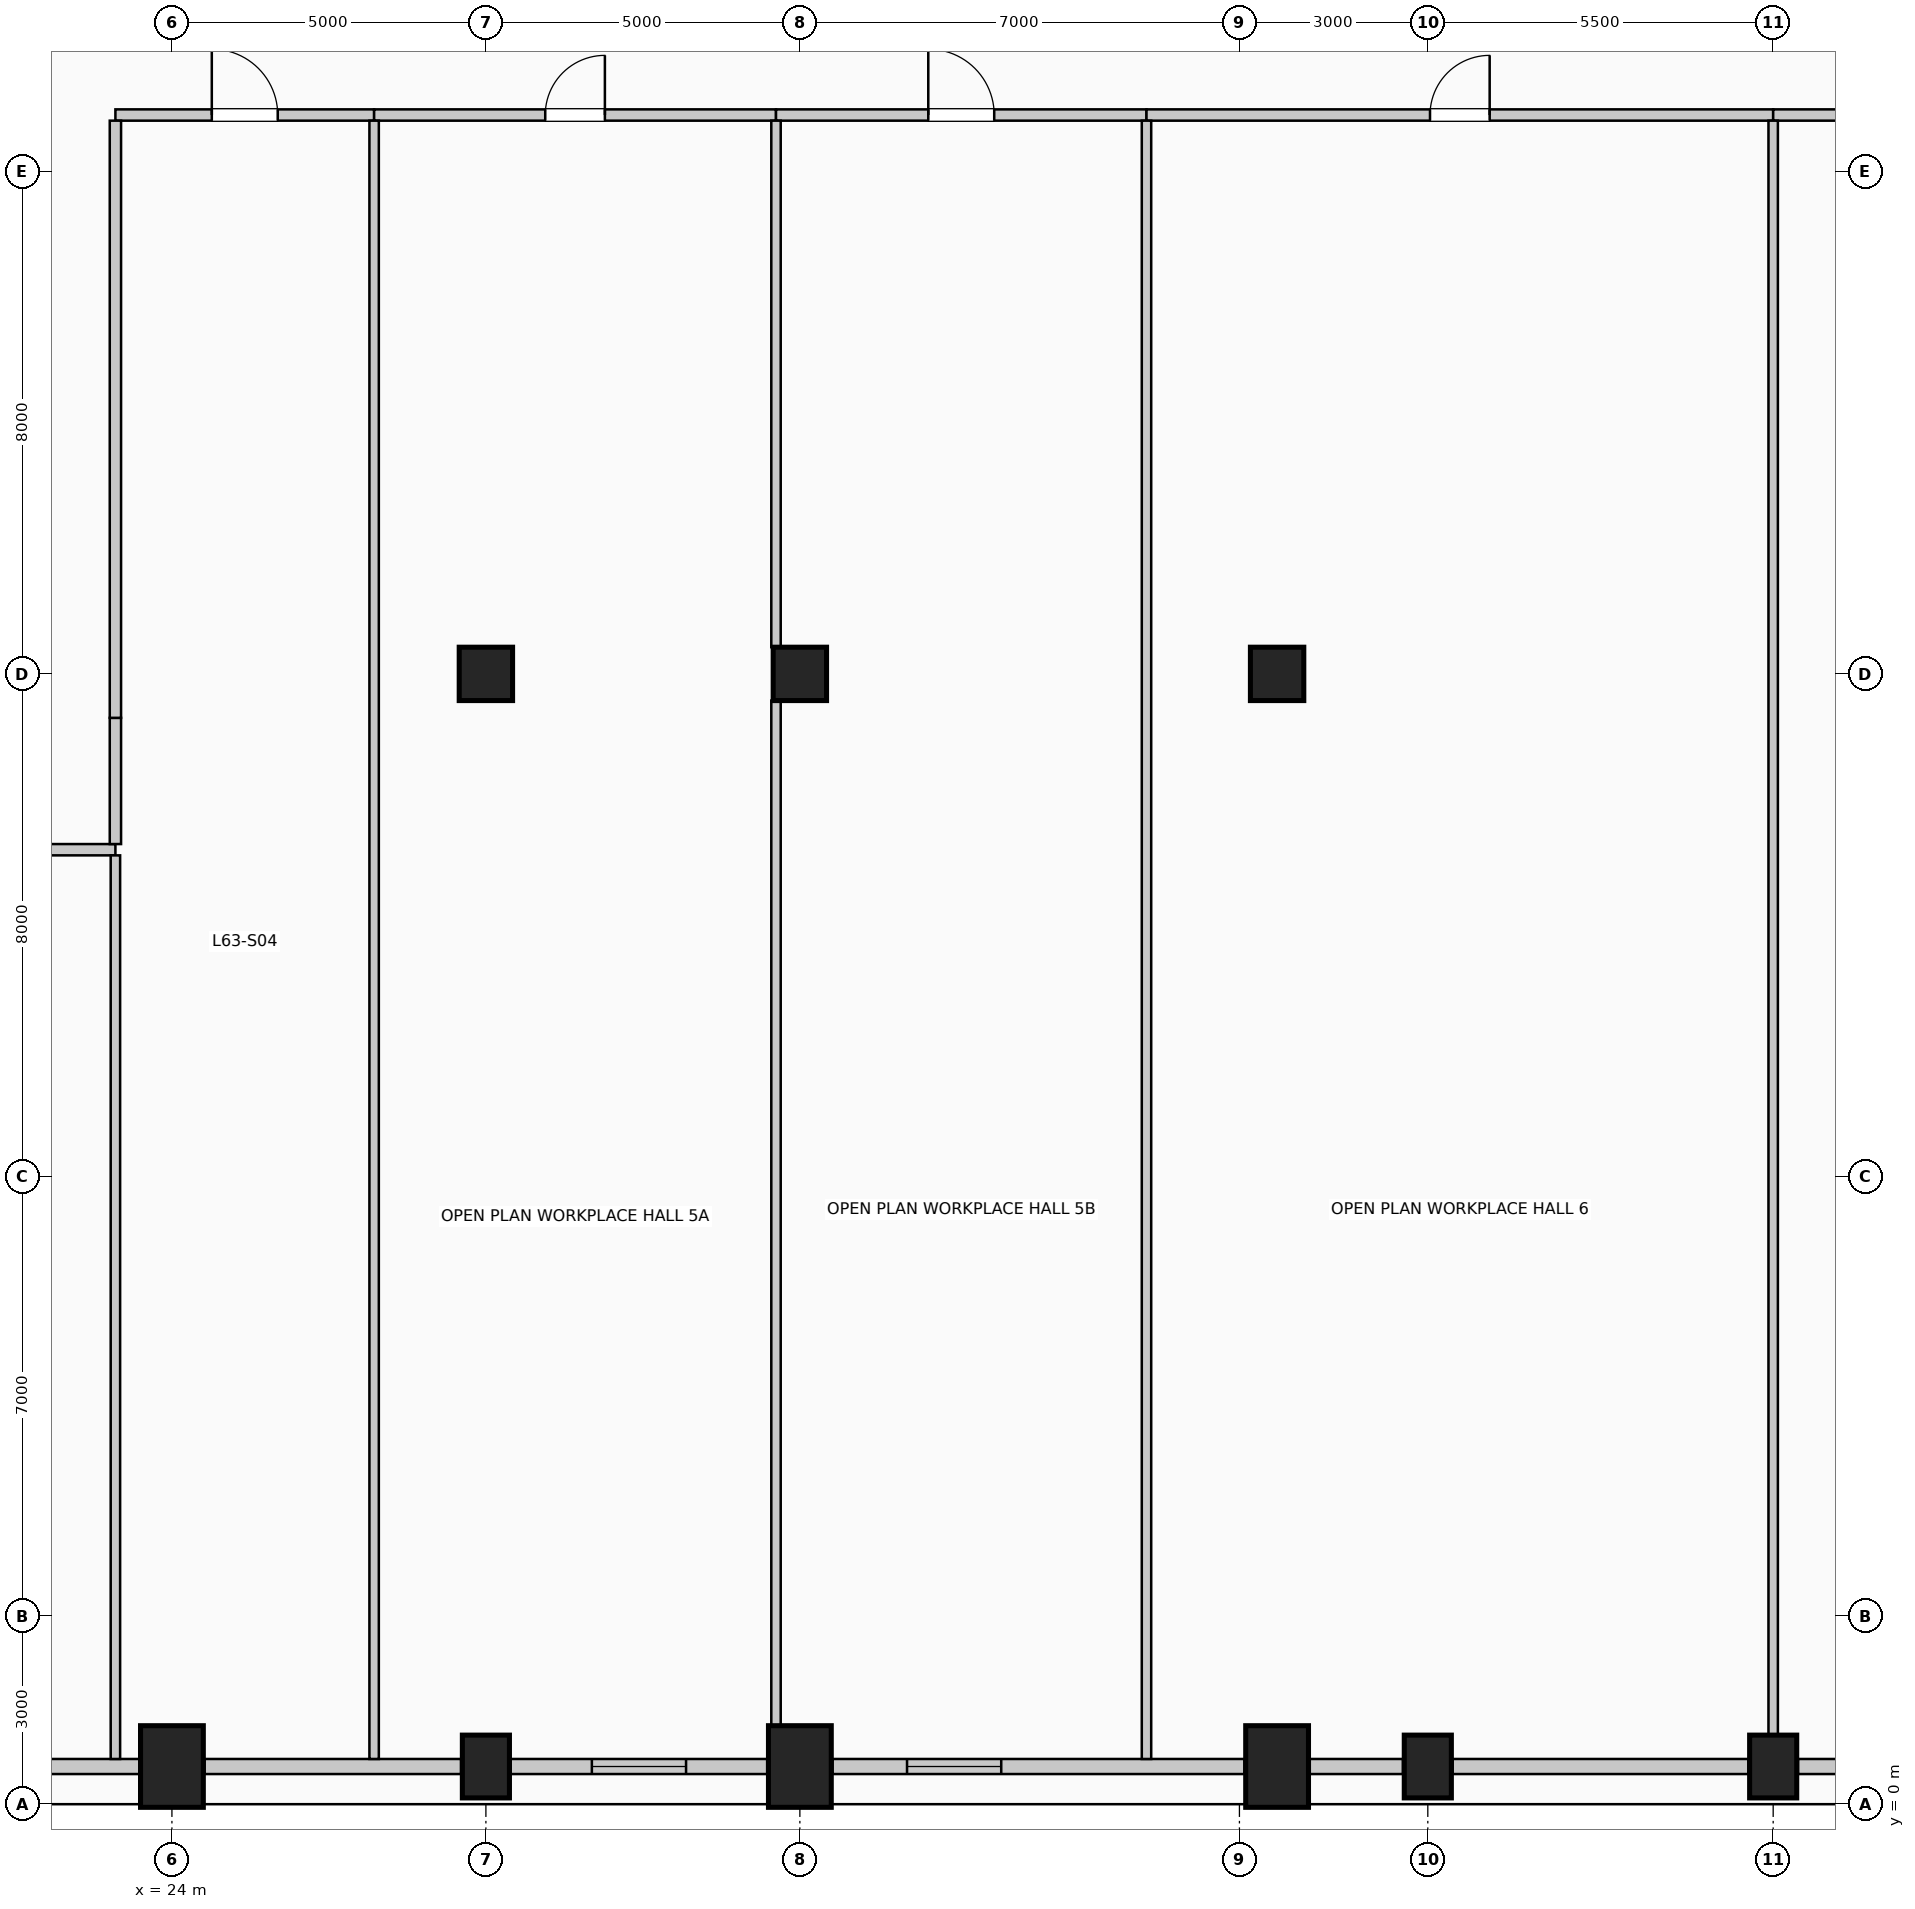
"""IFC4 building model, lengths in metres.
Left out: names, types, materials, properties, quantities, classifications, styles, units other than length and angle.
Written with IfcOpenShell. Run it as: python <this file> out.ifc"""

import sys

from ifc_helpers import new_model, si_unit, direction, frame, frame_2d, origin, origin_2d, place, context, subcontext, project, spatial, rectangle, circle, extrude, element, fill, save


model = new_model("IFC4")
c1 = context("Model", 3, precision=1e-05, world=origin(), true_north=direction((0.0, 1.0)))
c2 = subcontext(c1, "Body", "Model", "MODEL_VIEW")
j1 = project(units=[si_unit("LENGTHUNIT", "METRE"), si_unit("PLANEANGLEUNIT", "RADIAN")], contexts=[c1])
p1 = place(None, origin())
s1 = spatial("IfcSite", under=j1, at=p1, CompositionType="ELEMENT")
p2 = place(p1, origin())
s2 = spatial("IfcBuilding", under=s1, at=p2, CompositionType="ELEMENT")
p3 = place(p2, frame((0.0, 0.0, 260.6)))
s3 = spatial("IfcBuildingStorey", under=s2, at=p3, CompositionType="ELEMENT", Elevation=260.6)
p4 = place(p3, frame((24.0, 0.6, 0.0), z_axis=(0.0, 0.0, 1.0), x_axis=(1.0, 0.0, 0.0)))
e1 = element("IfcColumn", 1, at=p4, inside=s3, PredefinedType="COLUMN", context=c2, shape_type="SweptSolid", body=[
    extrude(rectangle(XDim=1.0, YDim=1.3, at=origin_2d()), origin(), (0.0, 0.0, 1.0), 4.0),
])
p5 = place(p3, frame((29.0, 0.6, 0.0), z_axis=(0.0, 0.0, 1.0), x_axis=(1.0, 0.0, 0.0)))
e2 = element("IfcColumn", 2, at=p5, inside=s3, PredefinedType="COLUMN", context=c2, shape_type="SweptSolid", body=[
    extrude(rectangle(XDim=0.75, YDim=1.0, at=origin_2d()), origin(), (0.0, 0.0, 1.0), 4.0),
])
for number, where, z_axis, x_axis in (
    (3, (34.0, 0.6, 0.0), (0.0, 0.0, 1.0), (1.0, 0.0, 0.0)),
    (4, (41.6, 0.6, 0.0), (0.0, 0.0, 1.0), (1.0, 0.0, 0.0)),
):
    element("IfcColumn", number, at=place(p3, frame(where, z_axis=z_axis, x_axis=x_axis)), inside=s3, PredefinedType="COLUMN", context=c2, shape_type="SweptSolid", body=[
        extrude(rectangle(XDim=1.0, YDim=1.3, at=origin_2d()), origin(), (0.0, 0.0, 1.0), 4.0),
    ])
for number, where, z_axis, x_axis in (
    (5, (44.0, 0.6, 0.0), (0.0, 0.0, 1.0), (1.0, 0.0, 0.0)),
    (6, (49.5, 0.6, 0.0), (0.0, 0.0, 1.0), (1.0, 0.0, 0.0)),
):
    element("IfcColumn", number, at=place(p3, frame(where, z_axis=z_axis, x_axis=x_axis)), inside=s3, PredefinedType="COLUMN", context=c2, shape_type="SweptSolid", body=[
        extrude(rectangle(XDim=0.75, YDim=1.0, at=origin_2d()), origin(), (0.0, 0.0, 1.0), 4.0),
    ])
for number, where, z_axis, x_axis in (
    (7, (29.0, 18.0, 0.0), (0.0, 0.0, 1.0), (1.0, 0.0, 0.0)),
    (8, (41.6, 18.0, 0.0), (0.0, 0.0, 1.0), (1.0, 0.0, 0.0)),
    (9, (34.0, 18.0, 0.0), (0.0, 0.0, 1.0), (1.0, 0.0, 0.0)),
):
    element("IfcColumn", number, at=place(p3, frame(where, z_axis=z_axis, x_axis=x_axis)), inside=s3, PredefinedType="COLUMN", context=c2, shape_type="SweptSolid", body=[
        extrude(circle(Radius=0.425, at=origin_2d()), origin(), (0.0, 0.0, 1.0), 4.0),
    ])
p6 = place(p3, frame((23.48, 0.6, 0.0), z_axis=(0.0, 0.0, 1.0), x_axis=(-1.0, 0.0, 0.0)))
e10 = element("IfcWall", 10, at=p6, inside=s3, PredefinedType="SOLIDWALL", context=c2, shape_type="SweptSolid", body=[
    extrude(rectangle(XDim=6.56, YDim=0.24, at=frame_2d((3.28, 0.0))), origin(), (0.0, 0.0, 1.0), 3.0),
])
p7 = place(p6, frame((3.873, 0.0, 0.42)))
e11 = element("IfcOpeningElement", 11, at=p7, cuts=e10, PredefinedType="OPENING", context=c2, shape_type="SweptSolid", body=[
    extrude(rectangle(XDim=1.5, YDim=2.2, at=frame_2d((0.75, 1.1))), frame((0.0, 0.13, 0.0), z_axis=(0.0, -1.0, 0.0), x_axis=(1.0, 0.0, 0.0)), (0.0, 0.0, 1.0), 0.26),
])
p8 = place(p3, frame((28.605, 0.6, 0.0), z_axis=(0.0, 0.0, 1.0), x_axis=(-1.0, 0.0, 0.0)))
e12 = element("IfcWall", 12, at=p8, inside=s3, PredefinedType="SOLIDWALL", context=c2, shape_type="SweptSolid", body=[
    extrude(rectangle(XDim=4.085, YDim=0.24, at=frame_2d((2.042, 0.0))), origin(), (0.0, 0.0, 1.0), 3.0),
])
p9 = place(p3, frame((33.48, 0.6, 0.0), z_axis=(0.0, 0.0, 1.0), x_axis=(-1.0, 0.0, 0.0)))
e13 = element("IfcWall", 13, at=p9, inside=s3, PredefinedType="SOLIDWALL", context=c2, shape_type="SweptSolid", body=[
    extrude(rectangle(XDim=4.085, YDim=0.24, at=frame_2d((2.042, 0.0))), origin(), (0.0, 0.0, 1.0), 3.0),
])
p10 = place(p9, frame((1.292, 0.0, 0.42)))
e14 = element("IfcOpeningElement", 14, at=p10, cuts=e13, PredefinedType="OPENING", context=c2, shape_type="SweptSolid", body=[
    extrude(rectangle(XDim=1.5, YDim=2.2, at=frame_2d((0.75, 1.1))), frame((0.0, 0.13, 0.0), z_axis=(0.0, -1.0, 0.0), x_axis=(1.0, 0.0, 0.0)), (0.0, 0.0, 1.0), 0.26),
])
p11 = place(p3, frame((41.08, 0.6, 0.0), z_axis=(0.0, 0.0, 1.0), x_axis=(-1.0, 0.0, 0.0)))
e15 = element("IfcWall", 15, at=p11, inside=s3, PredefinedType="SOLIDWALL", context=c2, shape_type="SweptSolid", body=[
    extrude(rectangle(XDim=6.56, YDim=0.24, at=frame_2d((3.28, 0.0))), origin(), (0.0, 0.0, 1.0), 3.0),
])
p12 = place(p11, frame((3.873, 0.0, 0.42)))
e16 = element("IfcOpeningElement", 16, at=p12, cuts=e15, PredefinedType="OPENING", context=c2, shape_type="SweptSolid", body=[
    extrude(rectangle(XDim=1.5, YDim=2.2, at=frame_2d((0.75, 1.1))), frame((0.0, 0.13, 0.0), z_axis=(0.0, -1.0, 0.0), x_axis=(1.0, 0.0, 0.0)), (0.0, 0.0, 1.0), 0.26),
])
p13 = place(p3, frame((43.605, 0.6, 0.0), z_axis=(0.0, 0.0, 1.0), x_axis=(-1.0, 0.0, 0.0)))
e17 = element("IfcWall", 17, at=p13, inside=s3, PredefinedType="SOLIDWALL", context=c2, shape_type="SweptSolid", body=[
    extrude(rectangle(XDim=1.485, YDim=0.24, at=frame_2d((0.742, 0.0))), origin(), (0.0, 0.0, 1.0), 3.0),
])
p14 = place(p3, frame((49.105, 0.6, 0.0), z_axis=(0.0, 0.0, 1.0), x_axis=(-1.0, 0.0, 0.0)))
e18 = element("IfcWall", 18, at=p14, inside=s3, PredefinedType="SOLIDWALL", context=c2, shape_type="SweptSolid", body=[
    extrude(rectangle(XDim=4.71, YDim=0.24, at=frame_2d((2.355, 0.0))), origin(), (0.0, 0.0, 1.0), 3.0),
])
p15 = place(p3, frame((54.005, 0.6, 0.0), z_axis=(0.0, 0.0, 1.0), x_axis=(-1.0, 0.0, 0.0)))
e19 = element("IfcWall", 19, at=p15, inside=s3, PredefinedType="SOLIDWALL", context=c2, shape_type="SweptSolid", body=[
    extrude(rectangle(XDim=4.11, YDim=0.24, at=frame_2d((2.055, 0.0))), origin(), (0.0, 0.0, 1.0), 3.0),
])
p16 = place(p15, frame((1.305, 0.0, 0.42)))
e20 = element("IfcOpeningElement", 20, at=p16, cuts=e19, PredefinedType="OPENING", context=c2, shape_type="SweptSolid", body=[
    extrude(rectangle(XDim=1.5, YDim=2.2, at=frame_2d((0.75, 1.1))), frame((0.0, 0.13, 0.0), z_axis=(0.0, -1.0, 0.0), x_axis=(1.0, 0.0, 0.0)), (0.0, 0.0, 1.0), 0.26),
])
p17 = place(p3, frame((16.4, 15.2, 0.0), z_axis=(0.0, 0.0, 1.0), x_axis=(1.0, 0.0, 0.0)))
e21 = element("IfcWall", 21, at=p17, inside=s3, PredefinedType="PARTITIONING", context=c2, shape_type="SweptSolid", body=[
    extrude(rectangle(XDim=6.7, YDim=0.18, at=frame_2d((3.35, 0.0))), origin(), (0.0, 0.0, 1.0), 3.75),
])
p18 = place(p17, frame((2.875, 0.0, 0.0)))
e22 = element("IfcOpeningElement", 22, at=p18, cuts=e21, PredefinedType="OPENING", context=c2, shape_type="SweptSolid", body=[
    extrude(rectangle(XDim=0.95, YDim=2.15, at=frame_2d((0.475, 1.075))), frame((0.0, 0.1, 0.0), z_axis=(0.0, -1.0, 0.0), x_axis=(1.0, 0.0, 0.0)), (0.0, 0.0, 1.0), 0.2),
])
p19 = place(p3, frame((23.1, 26.9, 0.0), z_axis=(0.0, 0.0, 1.0), x_axis=(1.0, 0.0, 0.0)))
e23 = element("IfcWall", 23, at=p19, inside=s3, PredefinedType="PARTITIONING", context=c2, shape_type="SweptSolid", body=[
    extrude(rectangle(XDim=4.12, YDim=0.18, at=frame_2d((2.06, 0.0))), origin(), (0.0, 0.0, 1.0), 3.75),
])
p20 = place(p19, frame((1.535, 0.0, 0.0)))
e24 = element("IfcOpeningElement", 24, at=p20, cuts=e23, PredefinedType="OPENING", context=c2, shape_type="SweptSolid", body=[
    extrude(rectangle(XDim=1.05, YDim=2.15, at=frame_2d((0.525, 1.075))), frame((0.0, 0.1, 0.0), z_axis=(0.0, -1.0, 0.0), x_axis=(1.0, 0.0, 0.0)), (0.0, 0.0, 1.0), 0.2),
])
p21 = place(p3, frame((27.22, 26.9, 0.0), z_axis=(0.0, 0.0, 1.0), x_axis=(1.0, 0.0, 0.0)))
e25 = element("IfcWall", 25, at=p21, inside=s3, PredefinedType="PARTITIONING", context=c2, shape_type="SweptSolid", body=[
    extrude(rectangle(XDim=6.4, YDim=0.18, at=frame_2d((3.2, 0.0))), origin(), (0.0, 0.0, 1.0), 3.75),
])
p22 = place(p21, frame((2.725, 0.0, 0.0)))
e26 = element("IfcOpeningElement", 26, at=p22, cuts=e25, PredefinedType="OPENING", context=c2, shape_type="SweptSolid", body=[
    extrude(rectangle(XDim=0.95, YDim=2.15, at=frame_2d((0.475, 1.075))), frame((0.0, 0.1, 0.0), z_axis=(0.0, -1.0, 0.0), x_axis=(1.0, 0.0, 0.0)), (0.0, 0.0, 1.0), 0.2),
])
p23 = place(p3, frame((33.62, 26.9, 0.0), z_axis=(0.0, 0.0, 1.0), x_axis=(1.0, 0.0, 0.0)))
e27 = element("IfcWall", 27, at=p23, inside=s3, PredefinedType="PARTITIONING", context=c2, shape_type="SweptSolid", body=[
    extrude(rectangle(XDim=5.9, YDim=0.18, at=frame_2d((2.95, 0.0))), origin(), (0.0, 0.0, 1.0), 3.75),
])
p24 = place(p23, frame((2.425, 0.0, 0.0)))
e28 = element("IfcOpeningElement", 28, at=p24, cuts=e27, PredefinedType="OPENING", context=c2, shape_type="SweptSolid", body=[
    extrude(rectangle(XDim=1.05, YDim=2.15, at=frame_2d((0.525, 1.075))), frame((0.0, 0.1, 0.0), z_axis=(0.0, -1.0, 0.0), x_axis=(1.0, 0.0, 0.0)), (0.0, 0.0, 1.0), 0.2),
])
p25 = place(p3, frame((39.52, 26.9, 0.0), z_axis=(0.0, 0.0, 1.0), x_axis=(1.0, 0.0, 0.0)))
e29 = element("IfcWall", 29, at=p25, inside=s3, PredefinedType="PARTITIONING", context=c2, shape_type="SweptSolid", body=[
    extrude(rectangle(XDim=9.98, YDim=0.18, at=frame_2d((4.99, 0.0))), origin(), (0.0, 0.0, 1.0), 3.75),
])
p26 = place(p25, frame((4.515, 0.0, 0.0)))
e30 = element("IfcOpeningElement", 30, at=p26, cuts=e29, PredefinedType="OPENING", context=c2, shape_type="SweptSolid", body=[
    extrude(rectangle(XDim=0.95, YDim=2.15, at=frame_2d((0.475, 1.075))), frame((0.0, 0.1, 0.0), z_axis=(0.0, -1.0, 0.0), x_axis=(1.0, 0.0, 0.0)), (0.0, 0.0, 1.0), 0.2),
])
p27 = place(p3, frame((49.5, 26.9, 0.0), z_axis=(0.0, 0.0, 1.0), x_axis=(1.0, 0.0, 0.0)))
e31 = element("IfcWall", 31, at=p27, inside=s3, PredefinedType="PARTITIONING", context=c2, shape_type="SweptSolid", body=[
    extrude(rectangle(XDim=7.78, YDim=0.18, at=frame_2d((3.89, 0.0))), origin(), (0.0, 0.0, 1.0), 3.75),
])
p28 = place(p27, frame((3.365, 0.0, 0.0)))
e32 = element("IfcOpeningElement", 32, at=p28, cuts=e31, PredefinedType="OPENING", context=c2, shape_type="SweptSolid", body=[
    extrude(rectangle(XDim=1.05, YDim=2.15, at=frame_2d((0.525, 1.075))), frame((0.0, 0.1, 0.0), z_axis=(0.0, -1.0, 0.0), x_axis=(1.0, 0.0, 0.0)), (0.0, 0.0, 1.0), 0.2),
])
p29 = place(p3, frame((23.1, 0.72, 0.0), z_axis=(0.0, 0.0, 1.0), x_axis=(0.0, 1.0, 0.0)))
e33 = element("IfcWall", 33, at=p29, inside=s3, PredefinedType="PARTITIONING", context=c2, shape_type="SweptSolid", body=[
    extrude(rectangle(XDim=14.39, YDim=0.15, at=frame_2d((7.195, 0.0))), origin(), (0.0, 0.0, 1.0), 3.75),
])
p30 = place(p3, frame((23.1, 15.29, 0.0), z_axis=(0.0, 0.0, 1.0), x_axis=(0.0, 1.0, 0.0)))
e34 = element("IfcWall", 34, at=p30, inside=s3, PredefinedType="PARTITIONING", context=c2, shape_type="SweptSolid", body=[
    extrude(rectangle(XDim=2.01, YDim=0.18, at=frame_2d((1.005, 0.0))), origin(), (0.0, 0.0, 1.0), 3.75),
])
p31 = place(p3, frame((23.1, 17.3, 0.0), z_axis=(0.0, 0.0, 1.0), x_axis=(0.0, 1.0, 0.0)))
e35 = element("IfcWall", 35, at=p31, inside=s3, PredefinedType="PARTITIONING", context=c2, shape_type="SweptSolid", body=[
    extrude(rectangle(XDim=9.51, YDim=0.18, at=frame_2d((4.755, 0.0))), origin(), (0.0, 0.0, 1.0), 3.75),
])
p32 = place(p3, frame((27.22, 0.72, 0.0), z_axis=(0.0, 0.0, 1.0), x_axis=(0.0, 1.0, 0.0)))
e36 = element("IfcWall", 36, at=p32, inside=s3, PredefinedType="PARTITIONING", context=c2, shape_type="SweptSolid", body=[
    extrude(rectangle(XDim=26.09, YDim=0.15, at=frame_2d((13.045, 0.0))), origin(), (0.0, 0.0, 1.0), 3.75),
])
p33 = place(p3, frame((33.62, 1.25, 0.0), z_axis=(0.0, 0.0, 1.0), x_axis=(0.0, 1.0, 0.0)))
e37 = element("IfcWall", 37, at=p33, inside=s3, PredefinedType="PARTITIONING", context=c2, shape_type="SweptSolid", body=[
    extrude(rectangle(XDim=16.325, YDim=0.15, at=frame_2d((8.163, 0.0))), origin(), (0.0, 0.0, 1.0), 3.75),
])
p34 = place(p3, frame((33.62, 18.425, 0.0), z_axis=(0.0, 0.0, 1.0), x_axis=(0.0, 1.0, 0.0)))
e38 = element("IfcWall", 38, at=p34, inside=s3, PredefinedType="PARTITIONING", context=c2, shape_type="SweptSolid", body=[
    extrude(rectangle(XDim=8.385, YDim=0.15, at=frame_2d((4.192, 0.0))), origin(), (0.0, 0.0, 1.0), 3.75),
])
p35 = place(p3, frame((39.52, 0.72, 0.0), z_axis=(0.0, 0.0, 1.0), x_axis=(0.0, 1.0, 0.0)))
e39 = element("IfcWall", 39, at=p35, inside=s3, PredefinedType="PARTITIONING", context=c2, shape_type="SweptSolid", body=[
    extrude(rectangle(XDim=26.09, YDim=0.15, at=frame_2d((13.045, 0.0))), origin(), (0.0, 0.0, 1.0), 3.75),
])
p36 = place(p3, frame((49.5, 1.1, 0.0), z_axis=(0.0, 0.0, 1.0), x_axis=(0.0, 1.0, 0.0)))
e40 = element("IfcWall", 40, at=p36, inside=s3, PredefinedType="PARTITIONING", context=c2, shape_type="SweptSolid", body=[
    extrude(rectangle(XDim=25.71, YDim=0.15, at=frame_2d((12.855, 0.0))), origin(), (0.0, 0.0, 1.0), 3.75),
])
p37 = place(p10, origin())
e41 = element("IfcWindow", 41, at=p37, inside=s3, PartitioningType="SINGLE_PANEL", PredefinedType="WINDOW", context=c2, shape_type="SweptSolid", body=[
    extrude(rectangle(XDim=1.5, YDim=2.2, at=frame_2d((0.75, 1.1))), frame((0.0, 0.03, 0.0), z_axis=(0.0, -1.0, 0.0), x_axis=(1.0, 0.0, 0.0)), (0.0, 0.0, 1.0), 0.06),
])
fill(e14, e41)
p38 = place(p12, origin())
e42 = element("IfcWindow", 42, at=p38, inside=s3, PartitioningType="SINGLE_PANEL", PredefinedType="WINDOW", context=c2, shape_type="SweptSolid", body=[
    extrude(rectangle(XDim=1.5, YDim=2.2, at=frame_2d((0.75, 1.1))), frame((0.0, 0.03, 0.0), z_axis=(0.0, -1.0, 0.0), x_axis=(1.0, 0.0, 0.0)), (0.0, 0.0, 1.0), 0.06),
])
fill(e16, e42)
p39 = place(p20, origin())
e43 = element("IfcDoor", 43, at=p39, inside=s3, OperationType="SINGLE_SWING_LEFT", PredefinedType="DOOR", context=c2, shape_type="SweptSolid", body=[
    extrude(rectangle(XDim=1.05, YDim=2.15, at=frame_2d((0.525, 1.075))), frame((0.0, 0.025, 0.0), z_axis=(0.0, -1.0, 0.0), x_axis=(1.0, 0.0, 0.0)), (0.0, 0.0, 1.0), 0.05),
])
fill(e24, e43)
p40 = place(p22, origin())
e44 = element("IfcDoor", 44, at=p40, inside=s3, OperationType="SINGLE_SWING_RIGHT", PredefinedType="DOOR", context=c2, shape_type="SweptSolid", body=[
    extrude(rectangle(XDim=0.95, YDim=2.15, at=frame_2d((0.475, 1.075))), frame((0.0, 0.025, 0.0), z_axis=(0.0, -1.0, 0.0), x_axis=(1.0, 0.0, 0.0)), (0.0, 0.0, 1.0), 0.05),
])
fill(e26, e44)
p41 = place(p24, origin())
e45 = element("IfcDoor", 45, at=p41, inside=s3, OperationType="SINGLE_SWING_LEFT", PredefinedType="DOOR", context=c2, shape_type="SweptSolid", body=[
    extrude(rectangle(XDim=1.05, YDim=2.15, at=frame_2d((0.525, 1.075))), frame((0.0, 0.025, 0.0), z_axis=(0.0, -1.0, 0.0), x_axis=(1.0, 0.0, 0.0)), (0.0, 0.0, 1.0), 0.05),
])
fill(e28, e45)
p42 = place(p26, origin())
e46 = element("IfcDoor", 46, at=p42, inside=s3, OperationType="SINGLE_SWING_RIGHT", PredefinedType="DOOR", context=c2, shape_type="SweptSolid", body=[
    extrude(rectangle(XDim=0.95, YDim=2.15, at=frame_2d((0.475, 1.075))), frame((0.0, 0.025, 0.0), z_axis=(0.0, -1.0, 0.0), x_axis=(1.0, 0.0, 0.0)), (0.0, 0.0, 1.0), 0.05),
])
fill(e30, e46)
save(model, sys.argv[1])
